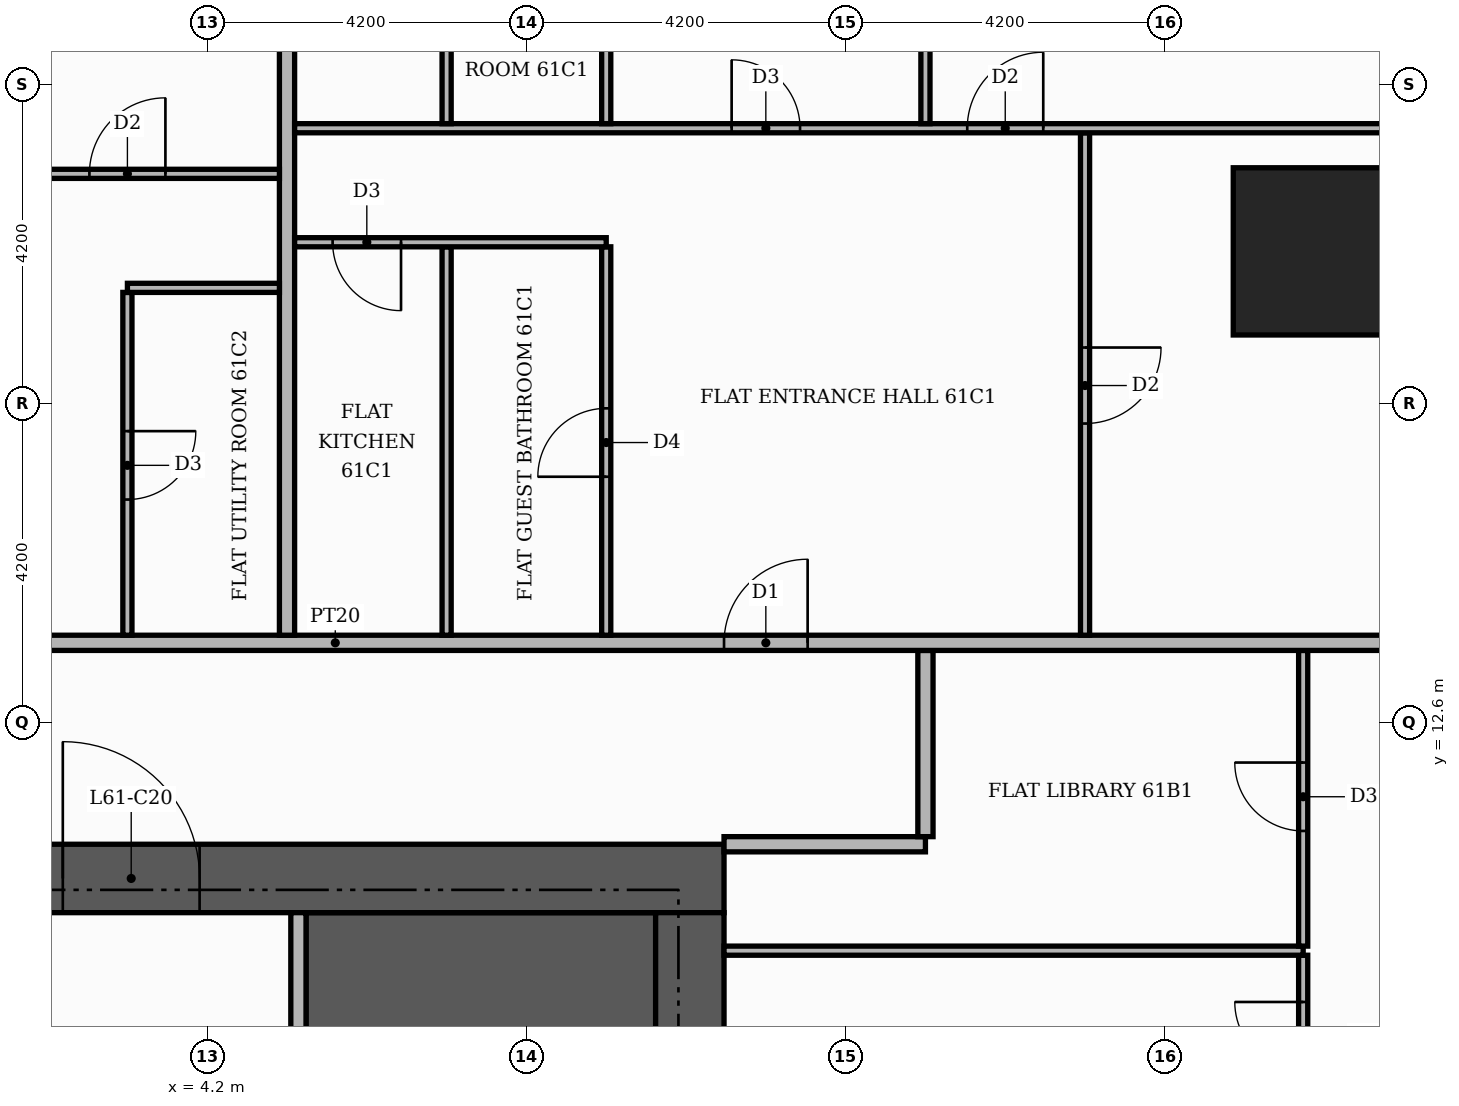
"""IFC4 building model, lengths in metres.
Left out: names, types, materials, properties, quantities, classifications, styles, units other than length and angle.
Written with IfcOpenShell. Run it as: python <this file> out.ifc"""

import sys

from ifc_helpers import new_model, si_unit, direction, frame, frame_2d, origin, origin_2d, place, context, subcontext, project, spatial, rectangle, extrude, element, fill, save


model = new_model("IFC4")
c1 = context("Model", 3, precision=1e-05, world=origin(), true_north=direction((0.0, 1.0)))
c2 = subcontext(c1, "Body", "Model", "MODEL_VIEW")
j1 = project(units=[si_unit("LENGTHUNIT", "METRE"), si_unit("PLANEANGLEUNIT", "RADIAN")], contexts=[c1])
p1 = place(None, origin())
s1 = spatial("IfcSite", under=j1, at=p1, CompositionType="ELEMENT")
p2 = place(p1, origin())
s2 = spatial("IfcBuilding", under=s1, at=p2, CompositionType="ELEMENT")
p3 = place(p2, frame((0.0, 0.0, 256.2)))
s3 = spatial("IfcBuildingStorey", under=s2, at=p3, CompositionType="ELEMENT", Elevation=256.2)
p4 = place(p3, frame((5.5, 9.15, 0.0), z_axis=(0.0, 0.0, 1.0), x_axis=(1.0, 0.0, 0.0)))
e1 = element("IfcWall", 1, at=p4, inside=s3, PredefinedType="SHEAR", context=c2, shape_type="SweptSolid", body=[
    extrude(rectangle(XDim=4.6, YDim=1.9, at=frame_2d((2.3, 0.0))), origin(), (0.0, 0.0, 1.0), 3.48),
])
p5 = place(p3, frame((-11.0, 10.55, 0.0), z_axis=(0.0, 0.0, 1.0), x_axis=(1.0, 0.0, 0.0)))
e2 = element("IfcWall", 2, at=p5, inside=s3, PredefinedType="SHEAR", context=c2, shape_type="SweptSolid", body=[
    extrude(rectangle(XDim=22.0, YDim=0.9, at=frame_2d((11.0, 0.0))), origin(), (0.0, 0.0, 1.0), 3.48),
])
p6 = place(p5, frame((13.3, 0.0, 0.0)))
e3 = element("IfcOpeningElement", 3, at=p6, cuts=e2, PredefinedType="OPENING", context=c2, shape_type="SweptSolid", body=[
    extrude(rectangle(XDim=1.8, YDim=2.2, at=frame_2d((0.9, 1.1))), frame((0.0, 0.46, 0.0), z_axis=(0.0, -1.0, 0.0), x_axis=(1.0, 0.0, 0.0)), (0.0, 0.0, 1.0), 0.92),
])
p7 = place(p3, frame((10.55, -10.1, 0.0), z_axis=(0.0, 0.0, 1.0), x_axis=(0.0, 1.0, 0.0)))
e4 = element("IfcWall", 4, at=p7, inside=s3, PredefinedType="SHEAR", context=c2, shape_type="SweptSolid", body=[
    extrude(rectangle(XDim=20.2, YDim=0.9, at=frame_2d((10.1, 0.0))), origin(), (0.0, 0.0, 1.0), 3.48),
])
p8 = place(p3, frame((18.8, 18.8, 0.0), z_axis=(0.0, 0.0, 1.0), x_axis=(1.0, 0.0, 0.0)))
e5 = element("IfcColumn", 5, at=p8, inside=s3, PredefinedType="COLUMN", context=c2, shape_type="SweptSolid", body=[
    extrude(rectangle(XDim=2.2, YDim=2.2, at=origin_2d()), origin(), (0.0, 0.0, 1.0), 3.9),
])
p9 = place(p3, frame((5.4, 5.5, 0.0), z_axis=(0.0, 0.0, 1.0), x_axis=(0.0, 1.0, 0.0)))
e6 = element("IfcWall", 6, at=p9, inside=s3, PredefinedType="PARTITIONING", context=c2, shape_type="SweptSolid", body=[
    extrude(rectangle(XDim=4.6, YDim=0.2, at=frame_2d((2.3, 0.0))), origin(), (0.0, 0.0, 1.0), 3.48),
])
p10 = place(p9, frame((0.25, 0.0, 0.0)))
e7 = element("IfcOpeningElement", 7, at=p10, cuts=e6, PredefinedType="OPENING", context=c2, shape_type="SweptSolid", body=[
    extrude(rectangle(XDim=1.0, YDim=2.1, at=frame_2d((0.5, 1.05))), frame((0.0, 0.11, 0.0), z_axis=(0.0, -1.0, 0.0), x_axis=(1.0, 0.0, 0.0)), (0.0, 0.0, 1.0), 0.22),
])
p11 = place(p3, frame((18.62, 7.41, 0.0), z_axis=(0.0, 0.0, 1.0), x_axis=(0.0, 1.0, 0.0)))
e8 = element("IfcWall", 8, at=p11, inside=s3, PredefinedType="PARTITIONING", context=c2, shape_type="SweptSolid", body=[
    extrude(rectangle(XDim=2.13, YDim=0.12, at=frame_2d((1.065, 0.0))), origin(), (0.0, 0.0, 1.0), 3.48),
])
p12 = place(p11, frame((0.615, 0.0, 0.0)))
e9 = element("IfcOpeningElement", 9, at=p12, cuts=e8, PredefinedType="OPENING", context=c2, shape_type="SweptSolid", body=[
    extrude(rectangle(XDim=0.9, YDim=2.1, at=frame_2d((0.45, 1.05))), frame((0.0, 0.07, 0.0), z_axis=(0.0, -1.0, 0.0), x_axis=(1.0, 0.0, 0.0)), (0.0, 0.0, 1.0), 0.14),
])
p13 = place(p3, frame((11.0, 9.6, 0.0), z_axis=(0.0, 0.0, 1.0), x_axis=(1.0, 0.0, 0.0)))
e10 = element("IfcWall", 10, at=p13, inside=s3, PredefinedType="PARTITIONING", context=c2, shape_type="SweptSolid", body=[
    extrude(rectangle(XDim=7.62, YDim=0.12, at=frame_2d((3.81, 0.0))), origin(), (0.0, 0.0, 1.0), 3.48),
])
p14 = place(p3, frame((18.62, 9.66, 0.0), z_axis=(0.0, 0.0, 1.0), x_axis=(0.0, 1.0, 0.0)))
e11 = element("IfcWall", 11, at=p14, inside=s3, PredefinedType="PARTITIONING", context=c2, shape_type="SweptSolid", body=[
    extrude(rectangle(XDim=3.89, YDim=0.12, at=frame_2d((1.945, 0.0))), origin(), (0.0, 0.0, 1.0), 3.48),
])
p15 = place(p14, frame((1.515, 0.0, 0.0)))
e12 = element("IfcOpeningElement", 12, at=p15, cuts=e11, PredefinedType="OPENING", context=c2, shape_type="SweptSolid", body=[
    extrude(rectangle(XDim=0.9, YDim=2.1, at=frame_2d((0.45, 1.05))), frame((0.0, 0.07, 0.0), z_axis=(0.0, -1.0, 0.0), x_axis=(1.0, 0.0, 0.0)), (0.0, 0.0, 1.0), 0.14),
])
p16 = place(p3, frame((11.0, 11.0, 0.0), z_axis=(0.0, 0.0, 1.0), x_axis=(1.0, 0.0, 0.0)))
e13 = element("IfcWall", 13, at=p16, inside=s3, PredefinedType="PARTITIONING", context=c2, shape_type="SweptSolid", body=[
    extrude(rectangle(XDim=2.65, YDim=0.2, at=frame_2d((1.325, 0.0))), origin(), (0.0, 0.0, 1.0), 3.48),
])
p17 = place(p3, frame((13.65, 11.1, 0.0), z_axis=(0.0, 0.0, 1.0), x_axis=(0.0, 1.0, 0.0)))
e14 = element("IfcWall", 14, at=p17, inside=s3, PredefinedType="PARTITIONING", context=c2, shape_type="SweptSolid", body=[
    extrude(rectangle(XDim=2.45, YDim=0.2, at=frame_2d((1.225, 0.0))), origin(), (0.0, 0.0, 1.0), 3.48),
])
p18 = place(p3, frame((-13.65, 13.65, 0.0), z_axis=(0.0, 0.0, 1.0), x_axis=(1.0, 0.0, 0.0)))
e15 = element("IfcWall", 15, at=p18, inside=s3, PredefinedType="PARTITIONING", context=c2, shape_type="SweptSolid", body=[
    extrude(rectangle(XDim=39.07, YDim=0.2, at=frame_2d((19.535, 0.0))), origin(), (0.0, 0.0, 1.0), 3.48),
])
p19 = place(p18, frame((24.65, 0.0, 0.0)))
e16 = element("IfcOpeningElement", 16, at=p19, cuts=e15, PredefinedType="OPENING", context=c2, shape_type="SweptSolid", body=[
    extrude(rectangle(XDim=1.1, YDim=2.4, at=frame_2d((0.55, 1.2))), frame((0.0, 0.11, 0.0), z_axis=(0.0, -1.0, 0.0), x_axis=(1.0, 0.0, 0.0)), (0.0, 0.0, 1.0), 0.22),
])
p20 = place(p18, frame((14.15, 0.0, 0.0)))
e17 = element("IfcOpeningElement", 17, at=p20, cuts=e15, PredefinedType="OPENING", context=c2, shape_type="SweptSolid", body=[
    extrude(rectangle(XDim=1.1, YDim=2.4, at=frame_2d((0.55, 1.2))), frame((0.0, 0.11, 0.0), z_axis=(0.0, -1.0, 0.0), x_axis=(1.0, 0.0, 0.0)), (0.0, 0.0, 1.0), 0.22),
])
p21 = place(p3, frame((3.15, 13.75, 0.0), z_axis=(0.0, 0.0, 1.0), x_axis=(0.0, 1.0, 0.0)))
e18 = element("IfcWall", 18, at=p21, inside=s3, PredefinedType="PARTITIONING", context=c2, shape_type="SweptSolid", body=[
    extrude(rectangle(XDim=4.51, YDim=0.12, at=frame_2d((2.255, 0.0))), origin(), (0.0, 0.0, 1.0), 3.48),
])
p22 = place(p21, frame((1.785, 0.0, 0.0)))
e19 = element("IfcOpeningElement", 19, at=p22, cuts=e18, PredefinedType="OPENING", context=c2, shape_type="SweptSolid", body=[
    extrude(rectangle(XDim=0.9, YDim=2.1, at=frame_2d((0.45, 1.05))), frame((0.0, 0.07, 0.0), z_axis=(0.0, -1.0, 0.0), x_axis=(1.0, 0.0, 0.0)), (0.0, 0.0, 1.0), 0.14),
])
p23 = place(p3, frame((5.25, 13.75, 0.0), z_axis=(0.0, 0.0, 1.0), x_axis=(0.0, 1.0, 0.0)))
e20 = element("IfcWall", 20, at=p23, inside=s3, PredefinedType="PARTITIONING", context=c2, shape_type="SweptSolid", body=[
    extrude(rectangle(XDim=11.67, YDim=0.2, at=frame_2d((5.835, 0.0))), origin(), (0.0, 0.0, 1.0), 3.48),
])
p24 = place(p3, frame((7.35, 13.75, 0.0), z_axis=(0.0, 0.0, 1.0), x_axis=(0.0, 1.0, 0.0)))
e21 = element("IfcWall", 21, at=p24, inside=s3, PredefinedType="PARTITIONING", context=c2, shape_type="SweptSolid", body=[
    extrude(rectangle(XDim=5.11, YDim=0.12, at=frame_2d((2.555, 0.0))), origin(), (0.0, 0.0, 1.0), 3.48),
])
p25 = place(p3, frame((9.45, 13.75, 0.0), z_axis=(0.0, 0.0, 1.0), x_axis=(0.0, 1.0, 0.0)))
e22 = element("IfcWall", 22, at=p25, inside=s3, PredefinedType="PARTITIONING", context=c2, shape_type="SweptSolid", body=[
    extrude(rectangle(XDim=5.11, YDim=0.12, at=frame_2d((2.555, 0.0))), origin(), (0.0, 0.0, 1.0), 3.48),
])
p26 = place(p25, frame((2.085, 0.0, 0.0)))
e23 = element("IfcOpeningElement", 23, at=p26, cuts=e22, PredefinedType="OPENING", context=c2, shape_type="SweptSolid", body=[
    extrude(rectangle(XDim=0.9, YDim=2.1, at=frame_2d((0.45, 1.05))), frame((0.0, 0.07, 0.0), z_axis=(0.0, -1.0, 0.0), x_axis=(1.0, 0.0, 0.0)), (0.0, 0.0, 1.0), 0.14),
])
p27 = place(p3, frame((15.75, 13.75, 0.0), z_axis=(0.0, 0.0, 1.0), x_axis=(0.0, 1.0, 0.0)))
e24 = element("IfcWall", 24, at=p27, inside=s3, PredefinedType="PARTITIONING", context=c2, shape_type="SweptSolid", body=[
    extrude(rectangle(XDim=6.61, YDim=0.12, at=frame_2d((3.305, 0.0))), origin(), (0.0, 0.0, 1.0), 3.48),
])
p28 = place(p27, frame((2.785, 0.0, 0.0)))
e25 = element("IfcOpeningElement", 25, at=p28, cuts=e24, PredefinedType="OPENING", context=c2, shape_type="SweptSolid", body=[
    extrude(rectangle(XDim=1.0, YDim=2.1, at=frame_2d((0.5, 1.05))), frame((0.0, 0.07, 0.0), z_axis=(0.0, -1.0, 0.0), x_axis=(1.0, 0.0, 0.0)), (0.0, 0.0, 1.0), 0.14),
])
p29 = place(p3, frame((3.15, 18.32, 0.0), z_axis=(0.0, 0.0, 1.0), x_axis=(1.0, 0.0, 0.0)))
e26 = element("IfcWall", 26, at=p29, inside=s3, PredefinedType="PARTITIONING", context=c2, shape_type="SweptSolid", body=[
    extrude(rectangle(XDim=2.0, YDim=0.12, at=frame_2d((1.0, 0.0))), origin(), (0.0, 0.0, 1.0), 3.48),
])
p30 = place(p3, frame((5.35, 18.92, 0.0), z_axis=(0.0, 0.0, 1.0), x_axis=(1.0, 0.0, 0.0)))
e27 = element("IfcWall", 27, at=p30, inside=s3, PredefinedType="PARTITIONING", context=c2, shape_type="SweptSolid", body=[
    extrude(rectangle(XDim=4.1, YDim=0.12, at=frame_2d((2.05, 0.0))), origin(), (0.0, 0.0, 1.0), 3.48),
])
p31 = place(p30, frame((0.5, 0.0, 0.0)))
e28 = element("IfcOpeningElement", 28, at=p31, cuts=e27, PredefinedType="OPENING", context=c2, shape_type="SweptSolid", body=[
    extrude(rectangle(XDim=0.9, YDim=2.1, at=frame_2d((0.45, 1.05))), frame((0.0, 0.07, 0.0), z_axis=(0.0, -1.0, 0.0), x_axis=(1.0, 0.0, 0.0)), (0.0, 0.0, 1.0), 0.14),
])
p32 = place(p3, frame((-13.55, 19.82, 0.0), z_axis=(0.0, 0.0, 1.0), x_axis=(1.0, 0.0, 0.0)))
e29 = element("IfcWall", 29, at=p32, inside=s3, PredefinedType="PARTITIONING", context=c2, shape_type="SweptSolid", body=[
    extrude(rectangle(XDim=18.7, YDim=0.12, at=frame_2d((9.35, 0.0))), origin(), (0.0, 0.0, 1.0), 3.48),
])
p33 = place(p32, frame((16.2, 0.0, 0.0)))
e30 = element("IfcOpeningElement", 30, at=p33, cuts=e29, PredefinedType="OPENING", context=c2, shape_type="SweptSolid", body=[
    extrude(rectangle(XDim=1.0, YDim=2.1, at=frame_2d((0.5, 1.05))), frame((0.0, 0.07, 0.0), z_axis=(0.0, -1.0, 0.0), x_axis=(1.0, 0.0, 0.0)), (0.0, 0.0, 1.0), 0.14),
])
p34 = place(p32, frame((12.05, 0.0, 0.0)))
e31 = element("IfcOpeningElement", 31, at=p34, cuts=e29, PredefinedType="OPENING", context=c2, shape_type="SweptSolid", body=[
    extrude(rectangle(XDim=0.9, YDim=2.1, at=frame_2d((0.45, 1.05))), frame((0.0, 0.07, 0.0), z_axis=(0.0, -1.0, 0.0), x_axis=(1.0, 0.0, 0.0)), (0.0, 0.0, 1.0), 0.14),
])
p35 = place(p32, frame((3.65, 0.0, 0.0)))
e32 = element("IfcOpeningElement", 32, at=p35, cuts=e29, PredefinedType="OPENING", context=c2, shape_type="SweptSolid", body=[
    extrude(rectangle(XDim=0.9, YDim=2.1, at=frame_2d((0.45, 1.05))), frame((0.0, 0.07, 0.0), z_axis=(0.0, -1.0, 0.0), x_axis=(1.0, 0.0, 0.0)), (0.0, 0.0, 1.0), 0.14),
])
p36 = place(p3, frame((5.35, 20.42, 0.0), z_axis=(0.0, 0.0, 1.0), x_axis=(1.0, 0.0, 0.0)))
e33 = element("IfcWall", 33, at=p36, inside=s3, PredefinedType="PARTITIONING", context=c2, shape_type="SweptSolid", body=[
    extrude(rectangle(XDim=15.369, YDim=0.12, at=frame_2d((7.685, 0.0))), origin(), (0.0, 0.0, 1.0), 3.48),
])
p37 = place(p36, frame((8.85, 0.0, 0.0)))
e34 = element("IfcOpeningElement", 34, at=p37, cuts=e33, PredefinedType="OPENING", context=c2, shape_type="SweptSolid", body=[
    extrude(rectangle(XDim=1.0, YDim=2.1, at=frame_2d((0.5, 1.05))), frame((0.0, 0.07, 0.0), z_axis=(0.0, -1.0, 0.0), x_axis=(1.0, 0.0, 0.0)), (0.0, 0.0, 1.0), 0.14),
])
p38 = place(p36, frame((5.75, 0.0, 0.0)))
e35 = element("IfcOpeningElement", 35, at=p38, cuts=e33, PredefinedType="OPENING", context=c2, shape_type="SweptSolid", body=[
    extrude(rectangle(XDim=0.9, YDim=2.1, at=frame_2d((0.45, 1.05))), frame((0.0, 0.07, 0.0), z_axis=(0.0, -1.0, 0.0), x_axis=(1.0, 0.0, 0.0)), (0.0, 0.0, 1.0), 0.14),
])
p39 = place(p3, frame((7.35, 20.48, 0.0), z_axis=(0.0, 0.0, 1.0), x_axis=(0.0, 1.0, 0.0)))
e36 = element("IfcWall", 36, at=p39, inside=s3, PredefinedType="PARTITIONING", context=c2, shape_type="SweptSolid", body=[
    extrude(rectangle(XDim=4.94, YDim=0.12, at=frame_2d((2.47, 0.0))), origin(), (0.0, 0.0, 1.0), 3.48),
])
p40 = place(p39, frame((2.14, 0.0, 0.0)))
e37 = element("IfcOpeningElement", 37, at=p40, cuts=e36, PredefinedType="OPENING", context=c2, shape_type="SweptSolid", body=[
    extrude(rectangle(XDim=0.9, YDim=2.1, at=frame_2d((0.45, 1.05))), frame((0.0, 0.07, 0.0), z_axis=(0.0, -1.0, 0.0), x_axis=(1.0, 0.0, 0.0)), (0.0, 0.0, 1.0), 0.14),
])
p41 = place(p3, frame((9.45, 20.48, 0.0), z_axis=(0.0, 0.0, 1.0), x_axis=(0.0, 1.0, 0.0)))
e38 = element("IfcWall", 38, at=p41, inside=s3, PredefinedType="PARTITIONING", context=c2, shape_type="SweptSolid", body=[
    extrude(rectangle(XDim=4.94, YDim=0.12, at=frame_2d((2.47, 0.0))), origin(), (0.0, 0.0, 1.0), 3.48),
])
p42 = place(p41, frame((2.14, 0.0, 0.0)))
e39 = element("IfcOpeningElement", 39, at=p42, cuts=e38, PredefinedType="OPENING", context=c2, shape_type="SweptSolid", body=[
    extrude(rectangle(XDim=0.9, YDim=2.1, at=frame_2d((0.45, 1.05))), frame((0.0, 0.07, 0.0), z_axis=(0.0, -1.0, 0.0), x_axis=(1.0, 0.0, 0.0)), (0.0, 0.0, 1.0), 0.14),
])
p43 = place(p3, frame((13.65, 20.48, 0.0), z_axis=(0.0, 0.0, 1.0), x_axis=(0.0, 1.0, 0.0)))
e40 = element("IfcWall", 40, at=p43, inside=s3, PredefinedType="PARTITIONING", context=c2, shape_type="SweptSolid", body=[
    extrude(rectangle(XDim=4.94, YDim=0.12, at=frame_2d((2.47, 0.0))), origin(), (0.0, 0.0, 1.0), 3.48),
])
p44 = place(p6, origin())
e41 = element("IfcDoor", 41, at=p44, inside=s3, OperationType="DOUBLE_DOOR_SINGLE_SWING", PredefinedType="DOOR", context=c2, shape_type="SweptSolid", body=[
    extrude(rectangle(XDim=1.8, YDim=2.2, at=frame_2d((0.9, 1.1))), frame((0.0, 0.025, 0.0), z_axis=(0.0, -1.0, 0.0), x_axis=(1.0, 0.0, 0.0)), (0.0, 0.0, 1.0), 0.05),
])
fill(e3, e41)
p45 = place(p12, origin())
e42 = element("IfcDoor", 42, at=p45, inside=s3, OperationType="SINGLE_SWING_RIGHT", PredefinedType="DOOR", context=c2, shape_type="SweptSolid", body=[
    extrude(rectangle(XDim=0.9, YDim=2.1, at=frame_2d((0.45, 1.05))), frame((0.0, 0.025, 0.0), z_axis=(0.0, -1.0, 0.0), x_axis=(1.0, 0.0, 0.0)), (0.0, 0.0, 1.0), 0.05),
])
fill(e9, e42)
p46 = place(p15, origin())
e43 = element("IfcDoor", 43, at=p46, inside=s3, OperationType="SINGLE_SWING_RIGHT", PredefinedType="DOOR", context=c2, shape_type="SweptSolid", body=[
    extrude(rectangle(XDim=0.9, YDim=2.1, at=frame_2d((0.45, 1.05))), frame((0.0, 0.025, 0.0), z_axis=(0.0, -1.0, 0.0), x_axis=(1.0, 0.0, 0.0)), (0.0, 0.0, 1.0), 0.05),
])
fill(e12, e43)
p47 = place(p19, origin())
e44 = element("IfcDoor", 44, at=p47, inside=s3, OperationType="SINGLE_SWING_RIGHT", PredefinedType="DOOR", context=c2, shape_type="SweptSolid", body=[
    extrude(rectangle(XDim=1.1, YDim=2.4, at=frame_2d((0.55, 1.2))), frame((0.0, 0.025, 0.0), z_axis=(0.0, -1.0, 0.0), x_axis=(1.0, 0.0, 0.0)), (0.0, 0.0, 1.0), 0.05),
])
fill(e16, e44)
p48 = place(p28, frame((1.0, 0.0, 0.0), z_axis=(0.0, 0.0, 1.0), x_axis=(-1.0, 0.0, 0.0)))
e45 = element("IfcDoor", 45, at=p48, inside=s3, OperationType="SINGLE_SWING_RIGHT", PredefinedType="DOOR", context=c2, shape_type="SweptSolid", body=[
    extrude(rectangle(XDim=1.0, YDim=2.1, at=frame_2d((0.5, 1.05))), frame((0.0, 0.025, 0.0), z_axis=(0.0, -1.0, 0.0), x_axis=(1.0, 0.0, 0.0)), (0.0, 0.0, 1.0), 0.05),
])
fill(e25, e45)
p49 = place(p26, origin())
e46 = element("IfcDoor", 46, at=p49, inside=s3, OperationType="SINGLE_SWING_LEFT", PredefinedType="DOOR", context=c2, shape_type="SweptSolid", body=[
    extrude(rectangle(XDim=0.9, YDim=2.1, at=frame_2d((0.45, 1.05))), frame((0.0, 0.025, 0.0), z_axis=(0.0, -1.0, 0.0), x_axis=(1.0, 0.0, 0.0)), (0.0, 0.0, 1.0), 0.05),
])
fill(e23, e46)
p50 = place(p31, frame((0.9, 0.0, 0.0), z_axis=(0.0, 0.0, 1.0), x_axis=(-1.0, 0.0, 0.0)))
e47 = element("IfcDoor", 47, at=p50, inside=s3, OperationType="SINGLE_SWING_RIGHT", PredefinedType="DOOR", context=c2, shape_type="SweptSolid", body=[
    extrude(rectangle(XDim=0.9, YDim=2.1, at=frame_2d((0.45, 1.05))), frame((0.0, 0.025, 0.0), z_axis=(0.0, -1.0, 0.0), x_axis=(1.0, 0.0, 0.0)), (0.0, 0.0, 1.0), 0.05),
])
fill(e28, e47)
p51 = place(p37, origin())
e48 = element("IfcDoor", 48, at=p51, inside=s3, OperationType="SINGLE_SWING_RIGHT", PredefinedType="DOOR", context=c2, shape_type="SweptSolid", body=[
    extrude(rectangle(XDim=1.0, YDim=2.1, at=frame_2d((0.5, 1.05))), frame((0.0, 0.025, 0.0), z_axis=(0.0, -1.0, 0.0), x_axis=(1.0, 0.0, 0.0)), (0.0, 0.0, 1.0), 0.05),
])
fill(e34, e48)
p52 = place(p38, origin())
e49 = element("IfcDoor", 49, at=p52, inside=s3, OperationType="SINGLE_SWING_LEFT", PredefinedType="DOOR", context=c2, shape_type="SweptSolid", body=[
    extrude(rectangle(XDim=0.9, YDim=2.1, at=frame_2d((0.45, 1.05))), frame((0.0, 0.025, 0.0), z_axis=(0.0, -1.0, 0.0), x_axis=(1.0, 0.0, 0.0)), (0.0, 0.0, 1.0), 0.05),
])
fill(e35, e49)
p53 = place(p22, frame((0.9, 0.0, 0.0), z_axis=(0.0, 0.0, 1.0), x_axis=(-1.0, 0.0, 0.0)))
e50 = element("IfcDoor", 50, at=p53, inside=s3, OperationType="SINGLE_SWING_RIGHT", PredefinedType="DOOR", context=c2, shape_type="SweptSolid", body=[
    extrude(rectangle(XDim=0.9, YDim=2.1, at=frame_2d((0.45, 1.05))), frame((0.0, 0.025, 0.0), z_axis=(0.0, -1.0, 0.0), x_axis=(1.0, 0.0, 0.0)), (0.0, 0.0, 1.0), 0.05),
])
fill(e19, e50)
p54 = place(p33, origin())
e51 = element("IfcDoor", 51, at=p54, inside=s3, OperationType="SINGLE_SWING_RIGHT", PredefinedType="DOOR", context=c2, shape_type="SweptSolid", body=[
    extrude(rectangle(XDim=1.0, YDim=2.1, at=frame_2d((0.5, 1.05))), frame((0.0, 0.025, 0.0), z_axis=(0.0, -1.0, 0.0), x_axis=(1.0, 0.0, 0.0)), (0.0, 0.0, 1.0), 0.05),
])
fill(e30, e51)
save(model, sys.argv[1])
